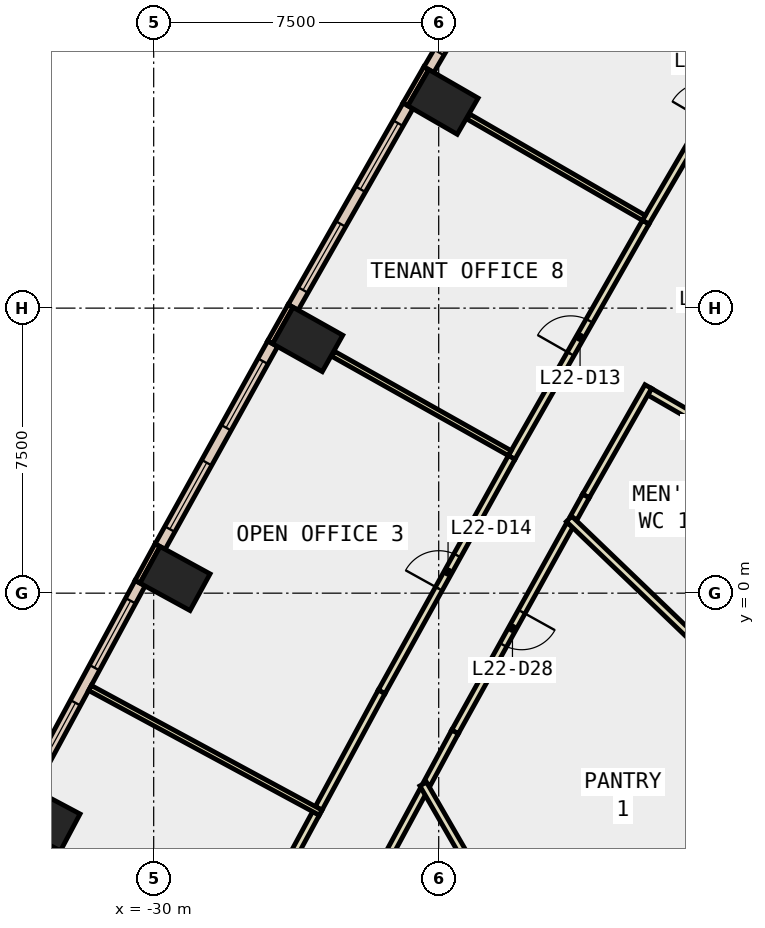
"""IFC4 building model, lengths in metres.
Left out: names, types, materials, properties, quantities, classifications, styles, units other than length and angle.
Written with IfcOpenShell. Run it as: python <this file> out.ifc"""

import sys

from ifc_helpers import new_model, si_unit, direction, frame, frame_2d, origin, origin_2d, place, context, subcontext, project, spatial, rectangle, extrude, element, fill, save


model = new_model("IFC4")
c1 = context("Model", 3, precision=1e-05, world=origin(), true_north=direction((0.0, 1.0)))
c2 = subcontext(c1, "Body", "Model", "MODEL_VIEW")
j1 = project(units=[si_unit("LENGTHUNIT", "METRE"), si_unit("PLANEANGLEUNIT", "RADIAN")], contexts=[c1])
p1 = place(None, origin())
s1 = spatial("IfcSite", under=j1, at=p1, CompositionType="ELEMENT")
p2 = place(p1, origin())
s2 = spatial("IfcBuilding", under=s1, at=p2, CompositionType="ELEMENT")
p3 = place(p2, frame((0.0, 0.0, 103.4)))
s3 = spatial("IfcBuildingStorey", under=s2, at=p3, CompositionType="ELEMENT", Elevation=103.4)
for number, where, z_axis, x_axis in (
    (1, (-22.387, 12.925, -0.4), (0.0, 0.0, 1.0), (0.5, 0.866, 0.0)),
    (2, (-25.948, 6.675, -0.4), (0.0, 0.0, 1.0), (0.49, 0.872, 0.0)),
    (3, (-29.438, 0.385, -0.4), (0.0, 0.0, 1.0), (0.48, 0.877, 0.0)),
    (4, (-32.858, -5.943, -0.4), (0.0, 0.0, 1.0), (0.469, 0.883, 0.0)),
):
    element("IfcColumn", number, at=place(p3, frame(where, z_axis=z_axis, x_axis=x_axis)), inside=s3, PredefinedType="COLUMN", context=c2, shape_type="SweptSolid", body=[
        extrude(rectangle(XDim=1.1, YDim=1.5, at=origin_2d()), origin(), (0.0, 0.0, 1.0), 4.2),
    ])
p4 = place(p3, frame((-9.31, -5.375, -0.4), z_axis=(0.0, 0.0, 1.0), x_axis=(-0.866017533419, -0.500013631625, 0.0)))
e5 = element("IfcWall", 5, at=p4, inside=s3, PredefinedType="SHEAR", context=c2, shape_type="SweptSolid", body=[
    extrude(rectangle(XDim=9.0, YDim=0.8, at=frame_2d((4.5, 0.0))), origin(), (0.0, 0.0, 1.0), 4.2),
])
p5 = place(p3, frame((-22.826, 13.814, 0.0), z_axis=(0.0, 0.0, 1.0), x_axis=(-0.499933745558, -0.866063652425, 0.0)))
e6 = element("IfcWall", 6, at=p5, inside=s3, PredefinedType="STANDARD", context=c2, shape_type="SweptSolid", body=[
    extrude(rectangle(XDim=1.1, YDim=0.15, at=frame_2d((0.55, 0.0))), origin(), (0.0, 0.0, 1.0), 3.8),
])
p6 = place(p3, frame((-26.398, 7.559, 0.0), z_axis=(0.0, 0.0, 1.0), x_axis=(-0.490008344094, -0.871717742574, 0.0)))
e7 = element("IfcWall", 7, at=p6, inside=s3, PredefinedType="STANDARD", context=c2, shape_type="SweptSolid", body=[
    extrude(rectangle(XDim=1.1, YDim=0.15, at=frame_2d((0.55, 0.0))), origin(), (0.0, 0.0, 1.0), 3.8),
])
p7 = place(p3, frame((-29.898, 1.264, 0.0), z_axis=(0.0, 0.0, 1.0), x_axis=(-0.479737645119, -0.877411985247, 0.0)))
e8 = element("IfcWall", 8, at=p7, inside=s3, PredefinedType="STANDARD", context=c2, shape_type="SweptSolid", body=[
    extrude(rectangle(XDim=1.101, YDim=0.15, at=frame_2d((0.55, 0.0))), origin(), (0.0, 0.0, 1.0), 3.8),
])
p8 = place(p3, frame((-19.677, 19.043, 0.0), z_axis=(0.0, 0.0, 1.0), x_axis=(-0.50490018297, -0.863177736759, 0.0)))
e9 = element("IfcWall", 9, at=p8, inside=s3, PredefinedType="STANDARD", context=c2, shape_type="SweptSolid", body=[
    extrude(rectangle(XDim=6.104, YDim=0.3, at=frame_2d((3.052, 0.0))), origin(), (0.0, 0.0, 1.0), 3.8),
])
p9 = place(p8, frame((0.526, 0.0, 0.9)))
e10 = element("IfcOpeningElement", 10, at=p9, cuts=e9, PredefinedType="OPENING", context=c2, shape_type="SweptSolid", body=[
    extrude(rectangle(XDim=2.0, YDim=2.6, at=frame_2d((1.0, 1.3))), frame((0.0, 0.16, 0.0), z_axis=(0.0, -1.0, 0.0), x_axis=(1.0, 0.0, 0.0)), (0.0, 0.0, 1.0), 0.32),
])
p10 = place(p8, frame((3.578, 0.0, 0.9)))
e11 = element("IfcOpeningElement", 11, at=p10, cuts=e9, PredefinedType="OPENING", context=c2, shape_type="SweptSolid", body=[
    extrude(rectangle(XDim=2.0, YDim=2.6, at=frame_2d((1.0, 1.3))), frame((0.0, 0.16, 0.0), z_axis=(0.0, -1.0, 0.0), x_axis=(1.0, 0.0, 0.0)), (0.0, 0.0, 1.0), 0.32),
])
p11 = place(p3, frame((-23.308, 12.823, 0.0), z_axis=(0.0, 0.0, 1.0), x_axis=(-0.495113375427, -0.868828375154, 0.0)))
e12 = element("IfcWall", 12, at=p11, inside=s3, PredefinedType="STANDARD", context=c2, shape_type="SweptSolid", body=[
    extrude(rectangle(XDim=6.104, YDim=0.3, at=frame_2d((3.052, 0.0))), origin(), (0.0, 0.0, 1.0), 3.8),
])
p12 = place(p11, frame((0.526, 0.0, 0.9)))
e13 = element("IfcOpeningElement", 13, at=p12, cuts=e12, PredefinedType="OPENING", context=c2, shape_type="SweptSolid", body=[
    extrude(rectangle(XDim=2.0, YDim=2.6, at=frame_2d((1.0, 1.3))), frame((0.0, 0.16, 0.0), z_axis=(0.0, -1.0, 0.0), x_axis=(1.0, 0.0, 0.0)), (0.0, 0.0, 1.0), 0.32),
])
p13 = place(p11, frame((3.578, 0.0, 0.9)))
e14 = element("IfcOpeningElement", 14, at=p13, cuts=e12, PredefinedType="OPENING", context=c2, shape_type="SweptSolid", body=[
    extrude(rectangle(XDim=2.0, YDim=2.6, at=frame_2d((1.0, 1.3))), frame((0.0, 0.16, 0.0), z_axis=(0.0, -1.0, 0.0), x_axis=(1.0, 0.0, 0.0)), (0.0, 0.0, 1.0), 0.32),
])
p14 = place(p3, frame((-26.869, 6.562, 0.0), z_axis=(0.0, 0.0, 1.0), x_axis=(-0.485170774404, -0.874419418623, 0.0)))
e15 = element("IfcWall", 15, at=p14, inside=s3, PredefinedType="STANDARD", context=c2, shape_type="SweptSolid", body=[
    extrude(rectangle(XDim=6.103, YDim=0.3, at=frame_2d((3.052, 0.0))), origin(), (0.0, 0.0, 1.0), 3.8),
])
p15 = place(p14, frame((0.526, 0.0, 0.9)))
e16 = element("IfcOpeningElement", 16, at=p15, cuts=e15, PredefinedType="OPENING", context=c2, shape_type="SweptSolid", body=[
    extrude(rectangle(XDim=2.0, YDim=2.6, at=frame_2d((1.0, 1.3))), frame((0.0, 0.16, 0.0), z_axis=(0.0, -1.0, 0.0), x_axis=(1.0, 0.0, 0.0)), (0.0, 0.0, 1.0), 0.32),
])
p16 = place(p14, frame((3.578, 0.0, 0.9)))
e17 = element("IfcOpeningElement", 17, at=p16, cuts=e15, PredefinedType="OPENING", context=c2, shape_type="SweptSolid", body=[
    extrude(rectangle(XDim=2.0, YDim=2.6, at=frame_2d((1.0, 1.3))), frame((0.0, 0.16, 0.0), z_axis=(0.0, -1.0, 0.0), x_axis=(1.0, 0.0, 0.0)), (0.0, 0.0, 1.0), 0.32),
])
p17 = place(p3, frame((-30.357, 0.262, 0.0), z_axis=(0.0, 0.0, 1.0), x_axis=(-0.475573079782, -0.879676216449, 0.0)))
e18 = element("IfcWall", 18, at=p17, inside=s3, PredefinedType="STANDARD", context=c2, shape_type="SweptSolid", body=[
    extrude(rectangle(XDim=6.104, YDim=0.3, at=frame_2d((3.052, 0.0))), origin(), (0.0, 0.0, 1.0), 3.8),
])
p18 = place(p17, frame((0.526, 0.0, 0.9)))
e19 = element("IfcOpeningElement", 19, at=p18, cuts=e18, PredefinedType="OPENING", context=c2, shape_type="SweptSolid", body=[
    extrude(rectangle(XDim=2.0, YDim=2.6, at=frame_2d((1.0, 1.3))), frame((0.0, 0.16, 0.0), z_axis=(0.0, -1.0, 0.0), x_axis=(1.0, 0.0, 0.0)), (0.0, 0.0, 1.0), 0.32),
])
p19 = place(p17, frame((3.578, 0.0, 0.9)))
e20 = element("IfcOpeningElement", 20, at=p19, cuts=e18, PredefinedType="OPENING", context=c2, shape_type="SweptSolid", body=[
    extrude(rectangle(XDim=2.0, YDim=2.6, at=frame_2d((1.0, 1.3))), frame((0.0, 0.16, 0.0), z_axis=(0.0, -1.0, 0.0), x_axis=(1.0, 0.0, 0.0)), (0.0, 0.0, 1.0), 0.32),
])
p20 = place(p3, frame((-15.86, 4.671, 0.0), z_axis=(0.0, 0.0, 1.0), x_axis=(-0.866192052573, 0.49971124468, 0.0)))
e21 = element("IfcWall", 21, at=p20, inside=s3, PredefinedType="PARTITIONING", context=c2, shape_type="SweptSolid", body=[
    extrude(rectangle(XDim=1.257, YDim=0.2, at=frame_2d((0.628, 0.0))), origin(), (0.0, 0.0, 1.0), 3.8),
])
p21 = place(p3, frame((-16.986, 5.436, 0.0), z_axis=(0.0, 0.0, 1.0), x_axis=(-0.49514688151, -0.868809280412, 0.0)))
e22 = element("IfcWall", 22, at=p21, inside=s3, PredefinedType="PARTITIONING", context=c2, shape_type="SweptSolid", body=[
    extrude(rectangle(XDim=3.314, YDim=0.2, at=frame_2d((1.657, 0.0))), origin(), (0.0, 0.0, 1.0), 3.8),
])
p22 = place(p3, frame((-18.627, 2.557, 0.0), z_axis=(0.0, 0.0, 1.0), x_axis=(-0.484771582084, -0.874640790956, 0.0)))
e23 = element("IfcWall", 23, at=p22, inside=s3, PredefinedType="PARTITIONING", context=c2, shape_type="SweptSolid", body=[
    extrude(rectangle(XDim=0.666, YDim=0.2, at=frame_2d((0.333, 0.0))), origin(), (0.0, 0.0, 1.0), 3.8),
])
p23 = place(p3, frame((-19.047, 1.799, 0.0), z_axis=(0.0, 0.0, 1.0), x_axis=(-0.485240396382, -0.87438078531, 0.0)))
e24 = element("IfcWall", 24, at=p23, inside=s3, PredefinedType="PARTITIONING", context=c2, shape_type="SweptSolid", body=[
    extrude(rectangle(XDim=6.232, YDim=0.2, at=frame_2d((3.116, 0.0))), origin(), (0.0, 0.0, 1.0), 3.8),
])
p24 = place(p23, frame((2.616, 0.0, 0.0)))
e25 = element("IfcOpeningElement", 25, at=p24, cuts=e24, PredefinedType="OPENING", context=c2, shape_type="SweptSolid", body=[
    extrude(rectangle(XDim=1.0, YDim=2.1, at=frame_2d((0.5, 1.05))), frame((0.0, 0.11, 0.0), z_axis=(0.0, -1.0, 0.0), x_axis=(1.0, 0.0, 0.0)), (0.0, 0.0, 1.0), 0.22),
])
p25 = place(p3, frame((-22.071, -3.65, 0.0), z_axis=(0.0, 0.0, 1.0), x_axis=(-0.475212034938, -0.879871309823, 0.0)))
e26 = element("IfcWall", 26, at=p25, inside=s3, PredefinedType="PARTITIONING", context=c2, shape_type="SweptSolid", body=[
    extrude(rectangle(XDim=1.557, YDim=0.2, at=frame_2d((0.779, 0.0))), origin(), (0.0, 0.0, 1.0), 3.8),
])
p26 = place(p3, frame((-22.906, -5.196, 0.0), z_axis=(0.0, 0.0, 1.0), x_axis=(-0.475448213767, -0.879743710421, 0.0)))
e27 = element("IfcWall", 27, at=p26, inside=s3, PredefinedType="PARTITIONING", context=c2, shape_type="SweptSolid", body=[
    extrude(rectangle(XDim=5.343, YDim=0.2, at=frame_2d((2.671, 0.0))), origin(), (0.0, 0.0, 1.0), 3.8),
])
p27 = place(p3, frame((-17.055, 9.76, 0.0), z_axis=(0.0, 0.0, 1.0), x_axis=(0.504817517618, 0.863226085047, 0.0)))
e28 = element("IfcWall", 28, at=p27, inside=s3, PredefinedType="PARTITIONING", context=c2, shape_type="SweptSolid", body=[
    extrude(rectangle(XDim=7.199, YDim=0.2, at=frame_2d((3.599, 0.0))), origin(), (0.0, 0.0, 1.0), 3.8),
])
p28 = place(p27, frame((3.099, 0.0, 0.0)))
e29 = element("IfcOpeningElement", 29, at=p28, cuts=e28, PredefinedType="OPENING", context=c2, shape_type="SweptSolid", body=[
    extrude(rectangle(XDim=1.0, YDim=2.1, at=frame_2d((0.5, 1.05))), frame((0.0, 0.11, 0.0), z_axis=(0.0, -1.0, 0.0), x_axis=(1.0, 0.0, 0.0)), (0.0, 0.0, 1.0), 0.22),
])
p29 = place(p3, frame((-20.581, 3.571, 0.0), z_axis=(0.0, 0.0, 1.0), x_axis=(0.495138372197, 0.868814129937, 0.0)))
e30 = element("IfcWall", 30, at=p29, inside=s3, PredefinedType="PARTITIONING", context=c2, shape_type="SweptSolid", body=[
    extrude(rectangle(XDim=7.124, YDim=0.2, at=frame_2d((3.562, 0.0))), origin(), (0.0, 0.0, 1.0), 3.8),
])
p30 = place(p29, frame((3.137, 0.0, 0.0)))
e31 = element("IfcOpeningElement", 31, at=p30, cuts=e30, PredefinedType="OPENING", context=c2, shape_type="SweptSolid", body=[
    extrude(rectangle(XDim=1.0, YDim=2.1, at=frame_2d((0.5, 1.05))), frame((0.0, 0.11, 0.0), z_axis=(0.0, -1.0, 0.0), x_axis=(1.0, 0.0, 0.0)), (0.0, 0.0, 1.0), 0.22),
])
p31 = place(p3, frame((-25.658, -5.661, 0.0), z_axis=(0.0, 0.0, 1.0), x_axis=(0.47543942367, 0.87974846088, 0.0)))
e32 = element("IfcWall", 32, at=p31, inside=s3, PredefinedType="PARTITIONING", context=c2, shape_type="SweptSolid", body=[
    extrude(rectangle(XDim=3.487, YDim=0.2, at=frame_2d((1.744, 0.0))), origin(), (0.0, 0.0, 1.0), 3.8),
])
p32 = place(p3, frame((-24.0, -2.593, 0.0), z_axis=(0.0, 0.0, 1.0), x_axis=(0.485148833338, 0.874431592242, 0.0)))
e33 = element("IfcWall", 33, at=p32, inside=s3, PredefinedType="PARTITIONING", context=c2, shape_type="SweptSolid", body=[
    extrude(rectangle(XDim=7.049, YDim=0.2, at=frame_2d((3.525, 0.0))), origin(), (0.0, 0.0, 1.0), 3.8),
])
p33 = place(p32, frame((3.099, 0.0, 0.0)))
e34 = element("IfcOpeningElement", 34, at=p33, cuts=e33, PredefinedType="OPENING", context=c2, shape_type="SweptSolid", body=[
    extrude(rectangle(XDim=1.0, YDim=2.1, at=frame_2d((0.5, 1.05))), frame((0.0, 0.11, 0.0), z_axis=(0.0, -1.0, 0.0), x_axis=(1.0, 0.0, 0.0)), (0.0, 0.0, 1.0), 0.22),
])
p34 = place(p3, frame((-27.387, -8.861, 0.0), z_axis=(0.0, 0.0, 1.0), x_axis=(0.475193364801, 0.879881393171, 0.0)))
e35 = element("IfcWall", 35, at=p34, inside=s3, PredefinedType="PARTITIONING", context=c2, shape_type="SweptSolid", body=[
    extrude(rectangle(XDim=3.487, YDim=0.2, at=frame_2d((1.744, 0.0))), origin(), (0.0, 0.0, 1.0), 3.8),
])
p35 = place(p3, frame((-19.278, -11.309, 0.0), z_axis=(0.0, 0.0, 1.0), x_axis=(-0.500044545065, 0.865999684151, 0.0)))
e36 = element("IfcWall", 36, at=p35, inside=s3, PredefinedType="PARTITIONING", context=c2, shape_type="SweptSolid", body=[
    extrude(rectangle(XDim=7.261, YDim=0.2, at=frame_2d((3.63, 0.0))), origin(), (0.0, 0.0, 1.0), 3.8),
])
p36 = place(p3, frame((-17.104, 9.875, 0.0), z_axis=(0.0, 0.0, 1.0), x_axis=(-0.866024640963, 0.500001321243, 0.0)))
e37 = element("IfcWall", 37, at=p36, inside=s3, PredefinedType="PARTITIONING", context=c2, shape_type="SweptSolid", body=[
    extrude(rectangle(XDim=5.33, YDim=0.15, at=frame_2d((2.665, 0.0))), origin(), (0.0, 0.0, 1.0), 3.8),
])
p37 = place(p3, frame((-20.631, 3.685, 0.0), z_axis=(0.0, 0.0, 1.0), x_axis=(-0.871680720442, 0.490074200106, 0.0)))
e38 = element("IfcWall", 38, at=p37, inside=s3, PredefinedType="PARTITIONING", context=c2, shape_type="SweptSolid", body=[
    extrude(rectangle(XDim=5.33, YDim=0.15, at=frame_2d((2.665, 0.0))), origin(), (0.0, 0.0, 1.0), 3.8),
])
p38 = place(p3, frame((-25.606, -5.775, 0.0), z_axis=(0.0, 0.0, 1.0), x_axis=(-0.87974530848, 0.475445256793, 0.0)))
e39 = element("IfcWall", 39, at=p38, inside=s3, PredefinedType="PARTITIONING", context=c2, shape_type="SweptSolid", body=[
    extrude(rectangle(XDim=6.901, YDim=0.15, at=frame_2d((3.45, 0.0))), origin(), (0.0, 0.0, 1.0), 3.8),
])
p39 = place(p3, frame((-10.96, -5.834, 0.0), z_axis=(0.0, 0.0, 1.0), x_axis=(-0.721236335428, 0.692689070549, 0.0)))
e40 = element("IfcWall", 40, at=p39, inside=s3, PredefinedType="PARTITIONING", context=c2, shape_type="SweptSolid", body=[
    extrude(rectangle(XDim=11.246, YDim=0.2, at=frame_2d((5.623, 0.0))), origin(), (0.0, 0.0, 1.0), 3.8),
])
p40 = place(p10, origin())
e41 = element("IfcWindow", 41, at=p40, inside=s3, PartitioningType="SINGLE_PANEL", PredefinedType="WINDOW", context=c2, shape_type="SweptSolid", body=[
    extrude(rectangle(XDim=2.0, YDim=2.6, at=frame_2d((1.0, 1.3))), frame((0.0, 0.03, 0.0), z_axis=(0.0, -1.0, 0.0), x_axis=(1.0, 0.0, 0.0)), (0.0, 0.0, 1.0), 0.06),
])
fill(e11, e41)
p41 = place(p12, origin())
e42 = element("IfcWindow", 42, at=p41, inside=s3, PartitioningType="SINGLE_PANEL", PredefinedType="WINDOW", context=c2, shape_type="SweptSolid", body=[
    extrude(rectangle(XDim=2.0, YDim=2.6, at=frame_2d((1.0, 1.3))), frame((0.0, 0.03, 0.0), z_axis=(0.0, -1.0, 0.0), x_axis=(1.0, 0.0, 0.0)), (0.0, 0.0, 1.0), 0.06),
])
fill(e13, e42)
p42 = place(p13, origin())
e43 = element("IfcWindow", 43, at=p42, inside=s3, PartitioningType="SINGLE_PANEL", PredefinedType="WINDOW", context=c2, shape_type="SweptSolid", body=[
    extrude(rectangle(XDim=2.0, YDim=2.6, at=frame_2d((1.0, 1.3))), frame((0.0, 0.03, 0.0), z_axis=(0.0, -1.0, 0.0), x_axis=(1.0, 0.0, 0.0)), (0.0, 0.0, 1.0), 0.06),
])
fill(e14, e43)
p43 = place(p15, origin())
e44 = element("IfcWindow", 44, at=p43, inside=s3, PartitioningType="SINGLE_PANEL", PredefinedType="WINDOW", context=c2, shape_type="SweptSolid", body=[
    extrude(rectangle(XDim=2.0, YDim=2.6, at=frame_2d((1.0, 1.3))), frame((0.0, 0.03, 0.0), z_axis=(0.0, -1.0, 0.0), x_axis=(1.0, 0.0, 0.0)), (0.0, 0.0, 1.0), 0.06),
])
fill(e16, e44)
p44 = place(p16, origin())
e45 = element("IfcWindow", 45, at=p44, inside=s3, PartitioningType="SINGLE_PANEL", PredefinedType="WINDOW", context=c2, shape_type="SweptSolid", body=[
    extrude(rectangle(XDim=2.0, YDim=2.6, at=frame_2d((1.0, 1.3))), frame((0.0, 0.03, 0.0), z_axis=(0.0, -1.0, 0.0), x_axis=(1.0, 0.0, 0.0)), (0.0, 0.0, 1.0), 0.06),
])
fill(e17, e45)
p45 = place(p18, origin())
e46 = element("IfcWindow", 46, at=p45, inside=s3, PartitioningType="SINGLE_PANEL", PredefinedType="WINDOW", context=c2, shape_type="SweptSolid", body=[
    extrude(rectangle(XDim=2.0, YDim=2.6, at=frame_2d((1.0, 1.3))), frame((0.0, 0.03, 0.0), z_axis=(0.0, -1.0, 0.0), x_axis=(1.0, 0.0, 0.0)), (0.0, 0.0, 1.0), 0.06),
])
fill(e19, e46)
p46 = place(p19, origin())
e47 = element("IfcWindow", 47, at=p46, inside=s3, PartitioningType="SINGLE_PANEL", PredefinedType="WINDOW", context=c2, shape_type="SweptSolid", body=[
    extrude(rectangle(XDim=2.0, YDim=2.6, at=frame_2d((1.0, 1.3))), frame((0.0, 0.03, 0.0), z_axis=(0.0, -1.0, 0.0), x_axis=(1.0, 0.0, 0.0)), (0.0, 0.0, 1.0), 0.06),
])
fill(e20, e47)
p47 = place(p30, origin())
e48 = element("IfcDoor", 48, at=p47, inside=s3, OperationType="SINGLE_SWING_LEFT", PredefinedType="DOOR", context=c2, shape_type="SweptSolid", body=[
    extrude(rectangle(XDim=1.0, YDim=2.1, at=frame_2d((0.5, 1.05))), frame((0.0, 0.025, 0.0), z_axis=(0.0, -1.0, 0.0), x_axis=(1.0, 0.0, 0.0)), (0.0, 0.0, 1.0), 0.05),
])
fill(e31, e48)
p48 = place(p33, origin())
e49 = element("IfcDoor", 49, at=p48, inside=s3, OperationType="SINGLE_SWING_LEFT", PredefinedType="DOOR", context=c2, shape_type="SweptSolid", body=[
    extrude(rectangle(XDim=1.0, YDim=2.1, at=frame_2d((0.5, 1.05))), frame((0.0, 0.025, 0.0), z_axis=(0.0, -1.0, 0.0), x_axis=(1.0, 0.0, 0.0)), (0.0, 0.0, 1.0), 0.05),
])
fill(e34, e49)
p49 = place(p24, origin())
e50 = element("IfcDoor", 50, at=p49, inside=s3, OperationType="SINGLE_SWING_LEFT", PredefinedType="DOOR", context=c2, shape_type="SweptSolid", body=[
    extrude(rectangle(XDim=1.0, YDim=2.1, at=frame_2d((0.5, 1.05))), frame((0.0, 0.025, 0.0), z_axis=(0.0, -1.0, 0.0), x_axis=(1.0, 0.0, 0.0)), (0.0, 0.0, 1.0), 0.05),
])
fill(e25, e50)
save(model, sys.argv[1])
